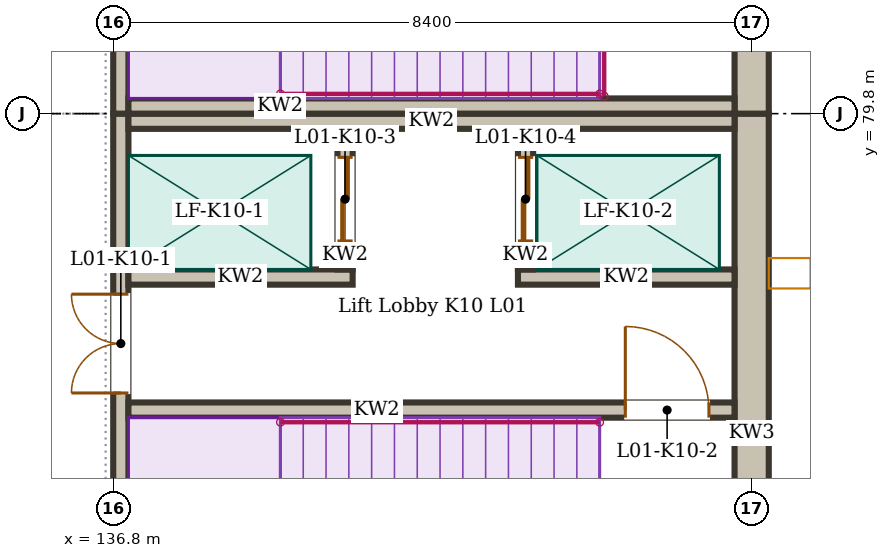
"""IFC4 building model, lengths in metres.
Left out: names, types, materials, properties, quantities, classifications, styles, units other than length and angle.
Written with IfcOpenShell. Run it as: python <this file> out.ifc"""

import sys

from ifc_helpers import new_model, si_unit, direction, frame, frame_2d, origin, place, context, subcontext, project, spatial, rectangle, extrude, element, fill, save


model = new_model("IFC4")
c1 = context("Model", 3, precision=1e-05, world=origin(), true_north=direction((0.0, 1.0)))
c2 = subcontext(c1, "Body", "Model", "MODEL_VIEW")
j1 = project(units=[si_unit("LENGTHUNIT", "METRE"), si_unit("PLANEANGLEUNIT", "RADIAN")], contexts=[c1])
p1 = place(None, origin())
s1 = spatial("IfcSite", under=j1, at=p1, CompositionType="ELEMENT")
p2 = place(p1, origin())
s2 = spatial("IfcBuilding", under=s1, at=p2, CompositionType="ELEMENT")
p3 = place(p2, frame((0.0, 0.0, 4.5)))
s3 = spatial("IfcBuildingStorey", under=s2, at=p3, CompositionType="ELEMENT", Elevation=4.5)
p4 = place(p3, frame((136.9, 71.4, 0.0), z_axis=(0.0, 0.0, 1.0), x_axis=(0.0, 1.0, 0.0)))
e1 = element("IfcWall", 1, at=p4, inside=s3, PredefinedType="SOLIDWALL", context=c2, shape_type="SweptSolid", body=[
    extrude(rectangle(XDim=8.4, YDim=0.2, at=frame_2d((4.2, 0.0))), origin(), (0.0, 0.0, 1.0), 4.5),
])
p5 = place(p4, frame((4.725, 0.0, 0.0)))
e2 = element("IfcOpeningElement", 2, at=p5, cuts=e1, PredefinedType="OPENING", context=c2, shape_type="SweptSolid", body=[
    extrude(rectangle(XDim=1.3, YDim=2.1, at=frame_2d((0.65, 1.05))), frame((0.0, 0.11, 0.0), z_axis=(0.0, -1.0, 0.0), x_axis=(1.0, 0.0, 0.0)), (0.0, 0.0, 1.0), 0.22),
])
p6 = place(p3, frame((145.2, 71.4, 0.0), z_axis=(0.0, 0.0, 1.0), x_axis=(0.0, 1.0, 0.0)))
e3 = element("IfcWall", 3, at=p6, inside=s3, PredefinedType="SOLIDWALL", context=c2, shape_type="SweptSolid", body=[
    extrude(rectangle(XDim=8.4, YDim=0.45, at=frame_2d((4.2, 0.0))), origin(), (0.0, 0.0, 1.0), 4.5),
])
p7 = place(p3, frame((137.0, 79.7, 0.0), z_axis=(0.0, 0.0, 1.0), x_axis=(1.0, 0.0, 0.0)))
e4 = element("IfcWall", 4, at=p7, inside=s3, PredefinedType="SOLIDWALL", context=c2, shape_type="SweptSolid", body=[
    extrude(rectangle(XDim=7.975, YDim=0.2, at=frame_2d((3.988, 0.0))), origin(), (0.0, 0.0, 1.0), 4.5),
])
p8 = place(p3, frame((137.0, 75.9, 0.0), z_axis=(0.0, 0.0, 1.0), x_axis=(1.0, 0.0, 0.0)))
e5 = element("IfcWall", 5, at=p8, inside=s3, PredefinedType="SOLIDWALL", context=c2, shape_type="SweptSolid", body=[
    extrude(rectangle(XDim=7.975, YDim=0.2, at=frame_2d((3.988, 0.0))), origin(), (0.0, 0.0, 1.0), 4.5),
])
p9 = place(p8, frame((6.538, 0.0, 0.0)))
e6 = element("IfcOpeningElement", 6, at=p9, cuts=e5, PredefinedType="OPENING", context=c2, shape_type="SweptSolid", body=[
    extrude(rectangle(XDim=1.1, YDim=2.1, at=frame_2d((0.55, 1.05))), frame((0.0, 0.11, 0.0), z_axis=(0.0, -1.0, 0.0), x_axis=(1.0, 0.0, 0.0)), (0.0, 0.0, 1.0), 0.22),
])
p10 = place(p3, frame((137.0, 77.65, 0.0), z_axis=(0.0, 0.0, 1.0), x_axis=(1.0, 0.0, 0.0)))
e7 = element("IfcWall", 7, at=p10, inside=s3, PredefinedType="SOLIDWALL", context=c2, shape_type="SweptSolid", body=[
    extrude(rectangle(XDim=2.95, YDim=0.2, at=frame_2d((1.475, 0.0))), origin(), (0.0, 0.0, 1.0), 4.5),
])
p11 = place(p3, frame((142.125, 77.65, 0.0), z_axis=(0.0, 0.0, 1.0), x_axis=(1.0, 0.0, 0.0)))
e8 = element("IfcWall", 8, at=p11, inside=s3, PredefinedType="SOLIDWALL", context=c2, shape_type="SweptSolid", body=[
    extrude(rectangle(XDim=2.85, YDim=0.2, at=frame_2d((1.425, 0.0))), origin(), (0.0, 0.0, 1.0), 4.5),
])
p12 = place(p3, frame((139.85, 77.75, 0.0), z_axis=(0.0, 0.0, 1.0), x_axis=(0.0, 1.0, 0.0)))
e9 = element("IfcWall", 9, at=p12, inside=s3, PredefinedType="SOLIDWALL", context=c2, shape_type="SweptSolid", body=[
    extrude(rectangle(XDim=1.85, YDim=0.2, at=frame_2d((0.925, 0.0))), origin(), (0.0, 0.0, 1.0), 4.5),
])
p13 = place(p12, frame((0.375, 0.0, 0.0)))
e10 = element("IfcOpeningElement", 10, at=p13, cuts=e9, PredefinedType="OPENING", context=c2, shape_type="SweptSolid", body=[
    extrude(rectangle(XDim=1.1, YDim=2.1, at=frame_2d((0.55, 1.05))), frame((0.0, 0.11, 0.0), z_axis=(0.0, -1.0, 0.0), x_axis=(1.0, 0.0, 0.0)), (0.0, 0.0, 1.0), 0.22),
])
p14 = place(p3, frame((142.225, 77.75, 0.0), z_axis=(0.0, 0.0, 1.0), x_axis=(0.0, 1.0, 0.0)))
e11 = element("IfcWall", 11, at=p14, inside=s3, PredefinedType="SOLIDWALL", context=c2, shape_type="SweptSolid", body=[
    extrude(rectangle(XDim=1.85, YDim=0.2, at=frame_2d((0.925, 0.0))), origin(), (0.0, 0.0, 1.0), 4.5),
])
p15 = place(p14, frame((0.375, 0.0, 0.0)))
e12 = element("IfcOpeningElement", 12, at=p15, cuts=e11, PredefinedType="OPENING", context=c2, shape_type="SweptSolid", body=[
    extrude(rectangle(XDim=1.1, YDim=2.1, at=frame_2d((0.55, 1.05))), frame((0.0, 0.11, 0.0), z_axis=(0.0, -1.0, 0.0), x_axis=(1.0, 0.0, 0.0)), (0.0, 0.0, 1.0), 0.22),
])
p16 = place(p3, frame((136.9, 79.8, 0.0), z_axis=(0.0, 0.0, 1.0), x_axis=(0.0, 1.0, 0.0)))
e13 = element("IfcWall", 13, at=p16, inside=s3, PredefinedType="SOLIDWALL", context=c2, shape_type="SweptSolid", body=[
    extrude(rectangle(XDim=8.4, YDim=0.2, at=frame_2d((4.2, 0.0))), origin(), (0.0, 0.0, 1.0), 4.5),
])
p17 = place(p16, frame((4.725, 0.0, 0.0)))
e14 = element("IfcOpeningElement", 14, at=p17, cuts=e13, PredefinedType="OPENING", context=c2, shape_type="SweptSolid", body=[
    extrude(rectangle(XDim=1.3, YDim=2.1, at=frame_2d((0.65, 1.05))), frame((0.0, 0.11, 0.0), z_axis=(0.0, -1.0, 0.0), x_axis=(1.0, 0.0, 0.0)), (0.0, 0.0, 1.0), 0.22),
])
p18 = place(p3, frame((145.2, 79.8, 0.0), z_axis=(0.0, 0.0, 1.0), x_axis=(0.0, 1.0, 0.0)))
e15 = element("IfcWall", 15, at=p18, inside=s3, PredefinedType="SOLIDWALL", context=c2, shape_type="SweptSolid", body=[
    extrude(rectangle(XDim=8.4, YDim=0.45, at=frame_2d((4.2, 0.0))), origin(), (0.0, 0.0, 1.0), 4.5),
])
p19 = place(p3, frame((137.0, 79.9, 0.0), z_axis=(0.0, 0.0, 1.0), x_axis=(1.0, 0.0, 0.0)))
e16 = element("IfcWall", 16, at=p19, inside=s3, PredefinedType="SOLIDWALL", context=c2, shape_type="SweptSolid", body=[
    extrude(rectangle(XDim=7.975, YDim=0.2, at=frame_2d((3.988, 0.0))), origin(), (0.0, 0.0, 1.0), 4.5),
])
p20 = place(p5, origin())
e17 = element("IfcDoor", 17, at=p20, inside=s3, OperationType="DOUBLE_DOOR_DOUBLE_SWING", PredefinedType="DOOR", context=c2, shape_type="SweptSolid", body=[
    extrude(rectangle(XDim=1.3, YDim=2.1, at=frame_2d((0.65, 1.05))), frame((0.0, 0.025, 0.0), z_axis=(0.0, -1.0, 0.0), x_axis=(1.0, 0.0, 0.0)), (0.0, 0.0, 1.0), 0.05),
])
fill(e2, e17)
p21 = place(p9, origin())
e18 = element("IfcDoor", 18, at=p21, inside=s3, OperationType="SINGLE_SWING_LEFT", PredefinedType="DOOR", context=c2, shape_type="SweptSolid", body=[
    extrude(rectangle(XDim=1.1, YDim=2.1, at=frame_2d((0.55, 1.05))), frame((0.0, 0.025, 0.0), z_axis=(0.0, -1.0, 0.0), x_axis=(1.0, 0.0, 0.0)), (0.0, 0.0, 1.0), 0.05),
])
fill(e6, e18)
p22 = place(p13, origin())
e19 = element("IfcDoor", 19, at=p22, inside=s3, OperationType="DOUBLE_DOOR_SLIDING", PredefinedType="DOOR", context=c2, shape_type="SweptSolid", body=[
    extrude(rectangle(XDim=1.1, YDim=2.1, at=frame_2d((0.55, 1.05))), frame((0.0, 0.025, 0.0), z_axis=(0.0, -1.0, 0.0), x_axis=(1.0, 0.0, 0.0)), (0.0, 0.0, 1.0), 0.05),
])
fill(e10, e19)
p23 = place(p15, origin())
e20 = element("IfcDoor", 20, at=p23, inside=s3, OperationType="DOUBLE_DOOR_SLIDING", PredefinedType="DOOR", context=c2, shape_type="SweptSolid", body=[
    extrude(rectangle(XDim=1.1, YDim=2.1, at=frame_2d((0.55, 1.05))), frame((0.0, 0.025, 0.0), z_axis=(0.0, -1.0, 0.0), x_axis=(1.0, 0.0, 0.0)), (0.0, 0.0, 1.0), 0.05),
])
fill(e12, e20)
save(model, sys.argv[1])
